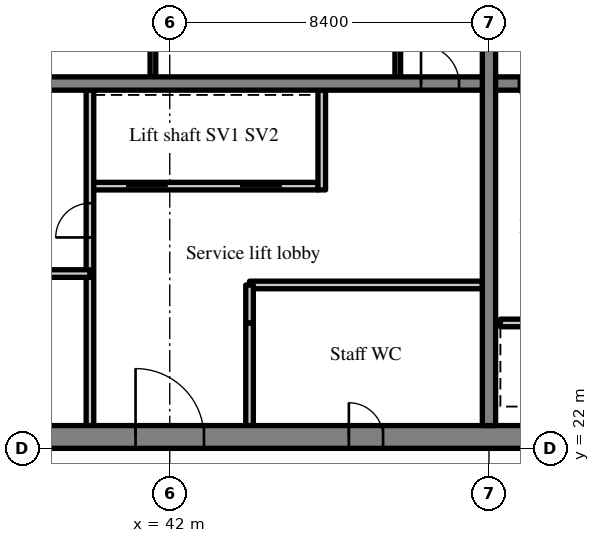
"""IFC4 building model, lengths in metres.
Left out: names, types, materials, properties, quantities, classifications, styles, units other than length and angle.
Written with IfcOpenShell. Run it as: python <this file> out.ifc"""

import sys

from ifc_helpers import new_model, si_unit, direction, frame, frame_2d, origin, place, context, subcontext, project, spatial, rectangle, extrude, source, transform, mapped, element, fill, save


model = new_model("IFC4")
c1 = context("Model", 3, precision=1e-05, world=origin(), true_north=direction((0.0, 1.0)))
c2 = subcontext(c1, "Body", "Model", "MODEL_VIEW")
j1 = project(units=[si_unit("LENGTHUNIT", "METRE"), si_unit("PLANEANGLEUNIT", "RADIAN")], contexts=[c1])
p1 = place(None, origin())
s1 = spatial("IfcSite", under=j1, at=p1, CompositionType="ELEMENT")
p2 = place(p1, origin())
s2 = spatial("IfcBuilding", under=s1, at=p2, CompositionType="ELEMENT")
p3 = place(p2, frame((0.0, 0.0, 225.7)))
s3 = spatial("IfcBuildingStorey", under=s2, at=p3, CompositionType="ELEMENT", Elevation=225.7)
m1 = source(origin(), c2, "Body", "SweptSolid", [
    extrude(rectangle(XDim=50.4, YDim=0.6, at=frame_2d((25.2, 0.0))), origin(), (0.0, 0.0, 1.0), 3.62),
])
p4 = place(p3, frame((25.2, 22.3, 0.0), z_axis=(0.0, 0.0, 1.0), x_axis=(1.0, 0.0, 0.0)))
e1 = element("IfcWall", 1, at=p4, inside=s3, PredefinedType="SHEAR", context=c2, shape_type="MappedRepresentation", body=[
    mapped(m1, transform((0.0, 0.0, 0.0), scale=1.0)),
])
m2 = source(origin(), c2, "Body", "SweptSolid", [
    extrude(rectangle(XDim=1.8, YDim=2.1, at=frame_2d((0.9, 1.05))), frame((0.0, 0.31, 0.0), z_axis=(0.0, -1.0, 0.0), x_axis=(1.0, 0.0, 0.0)), (0.0, 0.0, 1.0), 0.62),
])
p5 = place(p4, frame((15.9, 0.0, 0.0)))
e2 = element("IfcOpeningElement", 2, at=p5, cuts=e1, PredefinedType="OPENING", context=c2, shape_type="MappedRepresentation", body=[
    mapped(m2, transform((0.0, 0.0, 0.0), scale=1.0)),
])
m3 = source(origin(), c2, "Body", "SweptSolid", [
    extrude(rectangle(XDim=0.9, YDim=2.1, at=frame_2d((0.45, 1.05))), frame((0.0, 0.31, 0.0), z_axis=(0.0, -1.0, 0.0), x_axis=(1.0, 0.0, 0.0)), (0.0, 0.0, 1.0), 0.62),
])
p6 = place(p4, frame((11.187, 0.0, 0.0)))
e3 = element("IfcOpeningElement", 3, at=p6, cuts=e1, PredefinedType="OPENING", context=c2, shape_type="MappedRepresentation", body=[
    mapped(m3, transform((0.0, 0.0, 0.0), scale=1.0)),
])
p7 = place(p4, frame((21.513, 0.0, 0.0)))
e4 = element("IfcOpeningElement", 4, at=p7, cuts=e1, PredefinedType="OPENING", context=c2, shape_type="MappedRepresentation", body=[
    mapped(m3, transform((0.0, 0.0, 0.0), scale=1.0)),
])
p8 = place(p4, frame((32.7, 0.0, 0.0)))
e5 = element("IfcOpeningElement", 5, at=p8, cuts=e1, PredefinedType="OPENING", context=c2, shape_type="MappedRepresentation", body=[
    mapped(m2, transform((0.0, 0.0, 0.0), scale=1.0)),
])
m4 = source(origin(), c2, "Body", "SweptSolid", [
    extrude(rectangle(XDim=1.2, YDim=2.1, at=frame_2d((0.6, 1.05))), frame((0.0, 0.31, 0.0), z_axis=(0.0, -1.0, 0.0), x_axis=(1.0, 0.0, 0.0)), (0.0, 0.0, 1.0), 0.62),
])
p9 = place(p4, frame((6.488, 0.0, 0.0)))
e6 = element("IfcOpeningElement", 6, at=p9, cuts=e1, PredefinedType="OPENING", context=c2, shape_type="MappedRepresentation", body=[
    mapped(m4, transform((0.0, 0.0, 0.0), scale=1.0)),
])
p10 = place(p4, frame((47.925, 0.0, 0.0)))
e7 = element("IfcOpeningElement", 7, at=p10, cuts=e1, PredefinedType="OPENING", context=c2, shape_type="MappedRepresentation", body=[
    mapped(m4, transform((0.0, 0.0, 0.0), scale=1.0)),
])
m5 = source(origin(), c2, "Body", "SweptSolid", [
    extrude(rectangle(XDim=18.8, YDim=0.35, at=frame_2d((9.4, 0.0))), origin(), (0.0, 0.0, 1.0), 3.62),
])
p11 = place(p3, frame((50.4, 22.6, 0.0), z_axis=(0.0, 0.0, 1.0), x_axis=(0.0, 1.0, 0.0)))
e8 = element("IfcWall", 8, at=p11, inside=s3, PredefinedType="SHEAR", context=c2, shape_type="MappedRepresentation", body=[
    mapped(m5, transform((0.0, 0.0, 0.0), scale=1.0)),
])
m6 = source(origin(), c2, "Body", "SweptSolid", [
    extrude(rectangle(XDim=1.1, YDim=2.1, at=frame_2d((0.55, 1.05))), frame((0.0, 0.185, 0.0), z_axis=(0.0, -1.0, 0.0), x_axis=(1.0, 0.0, 0.0)), (0.0, 0.0, 1.0), 0.37),
])
p12 = place(p11, frame((12.85, 0.0, 0.0)))
e9 = element("IfcOpeningElement", 9, at=p12, cuts=e8, PredefinedType="OPENING", context=c2, shape_type="MappedRepresentation", body=[
    mapped(m6, transform((0.0, 0.0, 0.0), scale=1.0)),
])
m7 = source(origin(), c2, "Body", "SweptSolid", [
    extrude(rectangle(XDim=16.45, YDim=0.35, at=frame_2d((8.225, 0.0))), origin(), (0.0, 0.0, 1.0), 3.62),
])
p13 = place(p3, frame((33.775, 31.6, 0.0), z_axis=(0.0, 0.0, 1.0), x_axis=(1.0, 0.0, 0.0)))
e10 = element("IfcWall", 10, at=p13, inside=s3, PredefinedType="SHEAR", context=c2, shape_type="MappedRepresentation", body=[
    mapped(m7, transform((0.0, 0.0, 0.0), scale=1.0)),
])
m8 = source(origin(), c2, "Body", "SweptSolid", [
    extrude(rectangle(XDim=1.0, YDim=2.1, at=frame_2d((0.5, 1.05))), frame((0.0, 0.185, 0.0), z_axis=(0.0, -1.0, 0.0), x_axis=(1.0, 0.0, 0.0)), (0.0, 0.0, 1.0), 0.37),
])
p14 = place(p13, frame((14.837, 0.0, 0.0)))
e11 = element("IfcOpeningElement", 11, at=p14, cuts=e10, PredefinedType="OPENING", context=c2, shape_type="MappedRepresentation", body=[
    mapped(m8, transform((0.0, 0.0, 0.0), scale=1.0)),
])
m9 = source(origin(), c2, "Body", "SweptSolid", [
    extrude(rectangle(XDim=16.45, YDim=0.35, at=frame_2d((8.225, 0.0))), origin(), (0.0, 0.0, 1.0), 3.62),
])
p15 = place(p3, frame((50.575, 31.6, 0.0), z_axis=(0.0, 0.0, 1.0), x_axis=(1.0, 0.0, 0.0)))
e12 = element("IfcWall", 12, at=p15, inside=s3, PredefinedType="SHEAR", context=c2, shape_type="MappedRepresentation", body=[
    mapped(m9, transform((0.0, 0.0, 0.0), scale=1.0)),
])
p16 = place(p15, frame((0.613, 0.0, 0.0)))
e13 = element("IfcOpeningElement", 13, at=p16, cuts=e12, PredefinedType="OPENING", context=c2, shape_type="MappedRepresentation", body=[
    mapped(m8, transform((0.0, 0.0, 0.0), scale=1.0)),
])
m10 = source(origin(), c2, "Body", "SweptSolid", [
    extrude(rectangle(XDim=6.0, YDim=0.2, at=frame_2d((3.0, 0.0))), origin(), (0.0, 0.0, 1.0), 3.62),
])
p17 = place(p3, frame((39.9, 28.9, 0.0), z_axis=(0.0, 0.0, 1.0), x_axis=(1.0, 0.0, 0.0)))
e14 = element("IfcWall", 14, at=p17, inside=s3, PredefinedType="SOLIDWALL", context=c2, shape_type="MappedRepresentation", body=[
    mapped(m10, transform((0.0, 0.0, 0.0), scale=1.0)),
])
m11 = source(origin(), c2, "Body", "SweptSolid", [
    extrude(rectangle(XDim=1.1, YDim=2.1, at=frame_2d((0.55, 1.05))), frame((0.0, 0.11, 0.0), z_axis=(0.0, -1.0, 0.0), x_axis=(1.0, 0.0, 0.0)), (0.0, 0.0, 1.0), 0.22),
])
p18 = place(p17, frame((0.95, 0.0, 0.0)))
e15 = element("IfcOpeningElement", 15, at=p18, cuts=e14, PredefinedType="OPENING", context=c2, shape_type="MappedRepresentation", body=[
    mapped(m11, transform((0.0, 0.0, 0.0), scale=1.0)),
])
p19 = place(p17, frame((3.95, 0.0, 0.0)))
e16 = element("IfcOpeningElement", 16, at=p19, cuts=e14, PredefinedType="OPENING", context=c2, shape_type="MappedRepresentation", body=[
    mapped(m11, transform((0.0, 0.0, 0.0), scale=1.0)),
])
m12 = source(origin(), c2, "Body", "SweptSolid", [
    extrude(rectangle(XDim=8.825, YDim=0.2, at=frame_2d((4.413, 0.0))), origin(), (0.0, 0.0, 1.0), 3.62),
])
p20 = place(p3, frame((39.9, 22.6, 0.0), z_axis=(0.0, 0.0, 1.0), x_axis=(0.0, 1.0, 0.0)))
e17 = element("IfcWall", 17, at=p20, inside=s3, PredefinedType="PARTITIONING", context=c2, shape_type="MappedRepresentation", body=[
    mapped(m12, transform((0.0, 0.0, 0.0), scale=1.0)),
])
m13 = source(origin(), c2, "Body", "SweptSolid", [
    extrude(rectangle(XDim=0.9, YDim=2.1, at=frame_2d((0.45, 1.05))), frame((0.0, 0.11, 0.0), z_axis=(0.0, -1.0, 0.0), x_axis=(1.0, 0.0, 0.0)), (0.0, 0.0, 1.0), 0.22),
])
p21 = place(p20, frame((4.95, 0.0, 0.0)))
e18 = element("IfcOpeningElement", 18, at=p21, cuts=e17, PredefinedType="OPENING", context=c2, shape_type="MappedRepresentation", body=[
    mapped(m13, transform((0.0, 0.0, 0.0), scale=1.0)),
])
m14 = source(origin(), c2, "Body", "SweptSolid", [
    extrude(rectangle(XDim=2.7, YDim=0.2, at=frame_2d((1.35, 0.0))), origin(), (0.0, 0.0, 1.0), 3.62),
])
p22 = place(p3, frame((44.1, 22.6, 0.0), z_axis=(0.0, 0.0, 1.0), x_axis=(0.0, 1.0, 0.0)))
e19 = element("IfcWall", 19, at=p22, inside=s3, PredefinedType="PARTITIONING", context=c2, shape_type="MappedRepresentation", body=[
    mapped(m14, transform((0.0, 0.0, 0.0), scale=1.0)),
])
m15 = source(origin(), c2, "Body", "SweptSolid", [
    extrude(rectangle(XDim=2.625, YDim=0.2, at=frame_2d((1.312, 0.0))), origin(), (0.0, 0.0, 1.0), 3.62),
])
p23 = place(p3, frame((46.0, 28.8, 0.0), z_axis=(0.0, 0.0, 1.0), x_axis=(0.0, 1.0, 0.0)))
e20 = element("IfcWall", 20, at=p23, inside=s3, PredefinedType="SOLIDWALL", context=c2, shape_type="MappedRepresentation", body=[
    mapped(m15, transform((0.0, 0.0, 0.0), scale=1.0)),
])
m16 = source(origin(), c2, "Body", "SweptSolid", [
    extrude(rectangle(XDim=6.125, YDim=0.2, at=frame_2d((3.062, 0.0))), origin(), (0.0, 0.0, 1.0), 3.62),
])
for number, where, z_axis, x_axis in (
    (21, (33.775, 26.6, 0.0), (0.0, 0.0, 1.0), (1.0, 0.0, 0.0)),
    (22, (44.1, 26.3, 0.0), (0.0, 0.0, 1.0), (1.0, 0.0, 0.0)),
):
    element("IfcWall", number, at=place(p3, frame(where, z_axis=z_axis, x_axis=x_axis)), inside=s3, PredefinedType="PARTITIONING", context=c2, shape_type="MappedRepresentation", body=[
        mapped(m16, transform((0.0, 0.0, 0.0), scale=1.0)),
    ])
m17 = source(origin(), c2, "Body", "SweptSolid", [
    extrude(rectangle(XDim=1.0, YDim=0.2, at=frame_2d((0.5, 0.0))), origin(), (0.0, 0.0, 1.0), 3.62),
])
p24 = place(p3, frame((44.1, 25.3, 0.0), z_axis=(0.0, 0.0, 1.0), x_axis=(0.0, 1.0, 0.0)))
e23 = element("IfcWall", 23, at=p24, inside=s3, PredefinedType="PARTITIONING", context=c2, shape_type="MappedRepresentation", body=[
    mapped(m17, transform((0.0, 0.0, 0.0), scale=1.0)),
])
m18 = source(origin(), c2, "Body", "SweptSolid", [
    extrude(rectangle(XDim=3.225, YDim=0.15, at=frame_2d((1.613, 0.0))), origin(), (0.0, 0.0, 1.0), 3.62),
])
for number, where, z_axis, x_axis in (
    (24, (48.0, 31.775, 0.0), (0.0, 0.0, 1.0), (0.0, 1.0, 0.0)),
    (25, (41.557, 31.775, 0.0), (0.0, 0.0, 1.0), (0.0, 1.0, 0.0)),
):
    element("IfcWall", number, at=place(p3, frame(where, z_axis=z_axis, x_axis=x_axis)), inside=s3, PredefinedType="PARTITIONING", context=c2, shape_type="MappedRepresentation", body=[
        mapped(m18, transform((0.0, 0.0, 0.0), scale=1.0)),
    ])
p25 = place(p3, frame((56.7, 25.3, 0.0), z_axis=(0.0, 0.0, 1.0), x_axis=(-1.0, 0.0, 0.0)))
e26 = element("IfcWall", 26, at=p25, inside=s3, PredefinedType="SOLIDWALL", context=c2, shape_type="MappedRepresentation", body=[
    mapped(m10, transform((0.0, 0.0, 0.0), scale=1.0)),
])
p26 = place(p25, frame((0.95, 0.0, 0.0)))
e27 = element("IfcOpeningElement", 27, at=p26, cuts=e26, PredefinedType="OPENING", context=c2, shape_type="MappedRepresentation", body=[
    mapped(m11, transform((0.0, 0.0, 0.0), scale=1.0)),
])
p27 = place(p25, frame((3.95, 0.0, 0.0)))
e28 = element("IfcOpeningElement", 28, at=p27, cuts=e26, PredefinedType="OPENING", context=c2, shape_type="MappedRepresentation", body=[
    mapped(m11, transform((0.0, 0.0, 0.0), scale=1.0)),
])
m19 = source(origin(), c2, "Body", "SweptSolid", [
    extrude(rectangle(XDim=1.8, YDim=2.1, at=frame_2d((0.9, 1.05))), frame((0.0, 0.225, 0.0), z_axis=(0.0, -1.0, 0.0), x_axis=(1.0, 0.0, 0.0)), (0.0, 0.0, 1.0), 0.05),
])
p28 = place(p5, origin())
e29 = element("IfcDoor", 29, at=p28, inside=s3, OperationType="DOUBLE_DOOR_SINGLE_SWING", PredefinedType="DOOR", context=c2, shape_type="MappedRepresentation", body=[
    mapped(m19, transform((0.0, 0.0, 0.0), scale=1.0)),
])
fill(e2, e29)
m20 = source(origin(), c2, "Body", "SweptSolid", [
    extrude(rectangle(XDim=1.0, YDim=2.1, at=frame_2d((0.5, 1.05))), frame((0.0, 0.025, 0.0), z_axis=(0.0, -1.0, 0.0), x_axis=(1.0, 0.0, 0.0)), (0.0, 0.0, 1.0), 0.05),
])
p29 = place(p14, origin())
e30 = element("IfcDoor", 30, at=p29, inside=s3, OperationType="SINGLE_SWING_LEFT", PredefinedType="DOOR", context=c2, shape_type="MappedRepresentation", body=[
    mapped(m20, transform((0.0, 0.0, 0.0), scale=1.0)),
])
fill(e11, e30)
m21 = source(origin(), c2, "Body", "SweptSolid", [
    extrude(rectangle(XDim=1.1, YDim=2.1, at=frame_2d((0.55, 1.05))), frame((0.0, 0.025, 0.0), z_axis=(0.0, -1.0, 0.0), x_axis=(1.0, 0.0, 0.0)), (0.0, 0.0, 1.0), 0.05),
])
p30 = place(p18, origin())
e31 = element("IfcDoor", 31, at=p30, inside=s3, OperationType="SLIDING_TO_LEFT", PredefinedType="DOOR", context=c2, shape_type="MappedRepresentation", body=[
    mapped(m21, transform((0.0, 0.0, 0.0), scale=1.0)),
])
fill(e15, e31)
p31 = place(p19, origin())
e32 = element("IfcDoor", 32, at=p31, inside=s3, OperationType="SLIDING_TO_RIGHT", PredefinedType="DOOR", context=c2, shape_type="MappedRepresentation", body=[
    mapped(m21, transform((0.0, 0.0, 0.0), scale=1.0)),
])
fill(e16, e32)
m22 = source(origin(), c2, "Body", "SweptSolid", [
    extrude(rectangle(XDim=0.9, YDim=2.1, at=frame_2d((0.45, 1.05))), frame((0.0, 0.025, 0.0), z_axis=(0.0, -1.0, 0.0), x_axis=(1.0, 0.0, 0.0)), (0.0, 0.0, 1.0), 0.05),
])
p32 = place(p21, origin())
e33 = element("IfcDoor", 33, at=p32, inside=s3, OperationType="SINGLE_SWING_LEFT", PredefinedType="DOOR", context=c2, shape_type="MappedRepresentation", body=[
    mapped(m22, transform((0.0, 0.0, 0.0), scale=1.0)),
])
fill(e18, e33)
m23 = source(origin(), c2, "Body", "SweptSolid", [
    extrude(rectangle(XDim=0.9, YDim=2.1, at=frame_2d((0.45, 1.05))), frame((0.0, 0.225, 0.0), z_axis=(0.0, -1.0, 0.0), x_axis=(1.0, 0.0, 0.0)), (0.0, 0.0, 1.0), 0.05),
])
p33 = place(p7, origin())
e34 = element("IfcDoor", 34, at=p33, inside=s3, OperationType="SINGLE_SWING_LEFT", PredefinedType="DOOR", context=c2, shape_type="MappedRepresentation", body=[
    mapped(m23, transform((0.0, 0.0, 0.0), scale=1.0)),
])
fill(e4, e34)
p34 = place(p16, origin())
e35 = element("IfcDoor", 35, at=p34, inside=s3, OperationType="SINGLE_SWING_RIGHT", PredefinedType="DOOR", context=c2, shape_type="MappedRepresentation", body=[
    mapped(m20, transform((0.0, 0.0, 0.0), scale=1.0)),
])
fill(e13, e35)
save(model, sys.argv[1])
